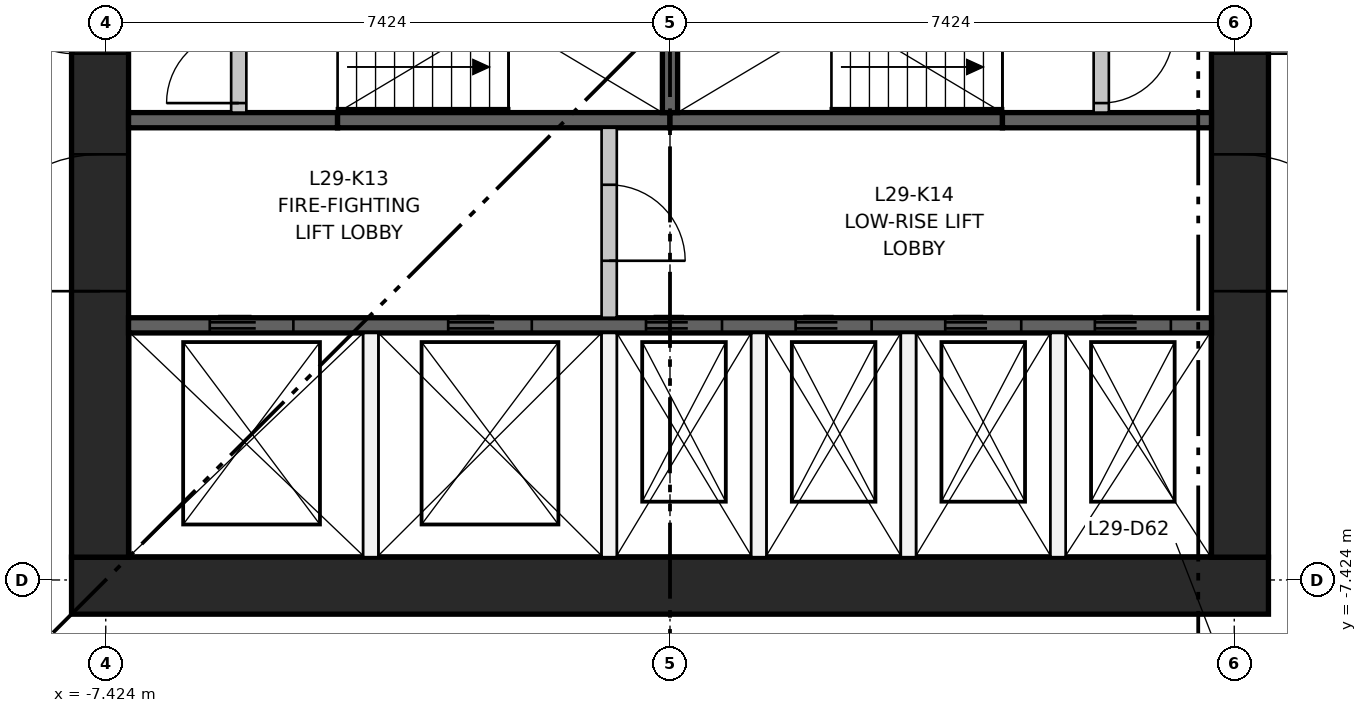
"""IFC4 building model, lengths in metres.
Left out: names, types, materials, properties, quantities, classifications, styles, units other than length and angle.
Written with IfcOpenShell. Run it as: python <this file> out.ifc"""

import sys

from ifc_helpers import new_model, si_unit, direction, frame, frame_2d, origin, place, context, subcontext, project, spatial, rectangle, extrude, element, fill, save


model = new_model("IFC4")
c1 = context("Model", 3, precision=1e-05, world=origin(), true_north=direction((0.0, 1.0)))
c2 = subcontext(c1, "Body", "Model", "MODEL_VIEW")
j1 = project(units=[si_unit("LENGTHUNIT", "METRE"), si_unit("PLANEANGLEUNIT", "RADIAN")], contexts=[c1])
p1 = place(None, origin())
s1 = spatial("IfcSite", under=j1, at=p1, CompositionType="ELEMENT")
p2 = place(p1, origin())
s2 = spatial("IfcBuilding", under=s1, at=p2, CompositionType="ELEMENT")
p3 = place(p2, frame((0.0, 0.0, 112.9)))
s3 = spatial("IfcBuildingStorey", under=s2, at=p3, CompositionType="ELEMENT", Elevation=112.9)
p4 = place(p3, frame((-7.874, -7.499, 0.0), z_axis=(0.0, 0.0, 1.0), x_axis=(1.0, 0.0, 0.0)))
e1 = element("IfcWall", 1, at=p4, inside=s3, PredefinedType="SHEAR", context=c2, shape_type="SweptSolid", body=[
    extrude(rectangle(XDim=15.748, YDim=0.75, at=frame_2d((7.874, 0.0))), origin(), (0.0, 0.0, 1.0), 3.65),
])
p5 = place(p3, frame((-7.499, -7.124, 0.0), z_axis=(0.0, 0.0, 1.0), x_axis=(0.0, 1.0, 0.0)))
e2 = element("IfcWall", 2, at=p5, inside=s3, PredefinedType="SHEAR", context=c2, shape_type="SweptSolid", body=[
    extrude(rectangle(XDim=14.248, YDim=0.75, at=frame_2d((7.124, 0.0))), origin(), (0.0, 0.0, 1.0), 3.65),
])
p6 = place(p5, frame((6.624, 0.0, 0.0)))
e3 = element("IfcOpeningElement", 3, at=p6, cuts=e2, PredefinedType="OPENING", context=c2, shape_type="SweptSolid", body=[
    extrude(rectangle(XDim=1.0, YDim=2.1, at=frame_2d((0.5, 1.05))), frame((0.0, 0.385, 0.0), z_axis=(0.0, -1.0, 0.0), x_axis=(1.0, 0.0, 0.0)), (0.0, 0.0, 1.0), 0.77),
])
p7 = place(p5, frame((3.5, 0.0, 0.0)))
e4 = element("IfcOpeningElement", 4, at=p7, cuts=e2, PredefinedType="OPENING", context=c2, shape_type="SweptSolid", body=[
    extrude(rectangle(XDim=1.8, YDim=2.1, at=frame_2d((0.9, 1.05))), frame((0.0, 0.385, 0.0), z_axis=(0.0, -1.0, 0.0), x_axis=(1.0, 0.0, 0.0)), (0.0, 0.0, 1.0), 0.77),
])
p8 = place(p5, frame((8.948, 0.0, 0.0)))
e5 = element("IfcOpeningElement", 5, at=p8, cuts=e2, PredefinedType="OPENING", context=c2, shape_type="SweptSolid", body=[
    extrude(rectangle(XDim=1.8, YDim=2.1, at=frame_2d((0.9, 1.05))), frame((0.0, 0.385, 0.0), z_axis=(0.0, -1.0, 0.0), x_axis=(1.0, 0.0, 0.0)), (0.0, 0.0, 1.0), 0.77),
])
p9 = place(p5, frame((12.124, 0.0, 0.0)))
e6 = element("IfcOpeningElement", 6, at=p9, cuts=e2, PredefinedType="OPENING", context=c2, shape_type="SweptSolid", body=[
    extrude(rectangle(XDim=1.0, YDim=2.1, at=frame_2d((0.5, 1.05))), frame((0.0, 0.385, 0.0), z_axis=(0.0, -1.0, 0.0), x_axis=(1.0, 0.0, 0.0)), (0.0, 0.0, 1.0), 0.77),
])
p10 = place(p3, frame((7.499, -7.124, 0.0), z_axis=(0.0, 0.0, 1.0), x_axis=(0.0, 1.0, 0.0)))
e7 = element("IfcWall", 7, at=p10, inside=s3, PredefinedType="SHEAR", context=c2, shape_type="SweptSolid", body=[
    extrude(rectangle(XDim=14.248, YDim=0.75, at=frame_2d((7.124, 0.0))), origin(), (0.0, 0.0, 1.0), 3.65),
])
p11 = place(p10, frame((6.624, 0.0, 0.0)))
e8 = element("IfcOpeningElement", 8, at=p11, cuts=e7, PredefinedType="OPENING", context=c2, shape_type="SweptSolid", body=[
    extrude(rectangle(XDim=1.0, YDim=2.1, at=frame_2d((0.5, 1.05))), frame((0.0, 0.385, 0.0), z_axis=(0.0, -1.0, 0.0), x_axis=(1.0, 0.0, 0.0)), (0.0, 0.0, 1.0), 0.77),
])
p12 = place(p10, frame((3.5, 0.0, 0.0)))
e9 = element("IfcOpeningElement", 9, at=p12, cuts=e7, PredefinedType="OPENING", context=c2, shape_type="SweptSolid", body=[
    extrude(rectangle(XDim=1.8, YDim=2.1, at=frame_2d((0.9, 1.05))), frame((0.0, 0.385, 0.0), z_axis=(0.0, -1.0, 0.0), x_axis=(1.0, 0.0, 0.0)), (0.0, 0.0, 1.0), 0.77),
])
p13 = place(p10, frame((8.948, 0.0, 0.0)))
e10 = element("IfcOpeningElement", 10, at=p13, cuts=e7, PredefinedType="OPENING", context=c2, shape_type="SweptSolid", body=[
    extrude(rectangle(XDim=1.8, YDim=2.1, at=frame_2d((0.9, 1.05))), frame((0.0, 0.385, 0.0), z_axis=(0.0, -1.0, 0.0), x_axis=(1.0, 0.0, 0.0)), (0.0, 0.0, 1.0), 0.77),
])
p14 = place(p3, frame((-7.124, -4.074, 0.0), z_axis=(0.0, 0.0, 1.0), x_axis=(1.0, 0.0, 0.0)))
e11 = element("IfcWall", 11, at=p14, inside=s3, PredefinedType="SHEAR", context=c2, shape_type="SweptSolid", body=[
    extrude(rectangle(XDim=14.248, YDim=0.2, at=frame_2d((7.124, 0.0))), origin(), (0.0, 0.0, 1.0), 3.3),
])
p15 = place(p14, frame((1.069, 0.0, 0.0)))
e12 = element("IfcOpeningElement", 12, at=p15, cuts=e11, PredefinedType="OPENING", context=c2, shape_type="SweptSolid", body=[
    extrude(rectangle(XDim=1.1, YDim=2.1, at=frame_2d((0.55, 1.05))), frame((0.0, 0.11, 0.0), z_axis=(0.0, -1.0, 0.0), x_axis=(1.0, 0.0, 0.0)), (0.0, 0.0, 1.0), 0.22),
])
p16 = place(p14, frame((4.206, 0.0, 0.0)))
e13 = element("IfcOpeningElement", 13, at=p16, cuts=e11, PredefinedType="OPENING", context=c2, shape_type="SweptSolid", body=[
    extrude(rectangle(XDim=1.1, YDim=2.1, at=frame_2d((0.55, 1.05))), frame((0.0, 0.11, 0.0), z_axis=(0.0, -1.0, 0.0), x_axis=(1.0, 0.0, 0.0)), (0.0, 0.0, 1.0), 0.22),
])
p17 = place(p14, frame((6.808, 0.0, 0.0)))
e14 = element("IfcOpeningElement", 14, at=p17, cuts=e11, PredefinedType="OPENING", context=c2, shape_type="SweptSolid", body=[
    extrude(rectangle(XDim=1.0, YDim=2.1, at=frame_2d((0.5, 1.05))), frame((0.0, 0.11, 0.0), z_axis=(0.0, -1.0, 0.0), x_axis=(1.0, 0.0, 0.0)), (0.0, 0.0, 1.0), 0.22),
])
p18 = place(p14, frame((8.777, 0.0, 0.0)))
e15 = element("IfcOpeningElement", 15, at=p18, cuts=e11, PredefinedType="OPENING", context=c2, shape_type="SweptSolid", body=[
    extrude(rectangle(XDim=1.0, YDim=2.1, at=frame_2d((0.5, 1.05))), frame((0.0, 0.11, 0.0), z_axis=(0.0, -1.0, 0.0), x_axis=(1.0, 0.0, 0.0)), (0.0, 0.0, 1.0), 0.22),
])
p19 = place(p14, frame((10.745, 0.0, 0.0)))
e16 = element("IfcOpeningElement", 16, at=p19, cuts=e11, PredefinedType="OPENING", context=c2, shape_type="SweptSolid", body=[
    extrude(rectangle(XDim=1.0, YDim=2.1, at=frame_2d((0.5, 1.05))), frame((0.0, 0.11, 0.0), z_axis=(0.0, -1.0, 0.0), x_axis=(1.0, 0.0, 0.0)), (0.0, 0.0, 1.0), 0.22),
])
p20 = place(p14, frame((12.714, 0.0, 0.0)))
e17 = element("IfcOpeningElement", 17, at=p20, cuts=e11, PredefinedType="OPENING", context=c2, shape_type="SweptSolid", body=[
    extrude(rectangle(XDim=1.0, YDim=2.1, at=frame_2d((0.5, 1.05))), frame((0.0, 0.11, 0.0), z_axis=(0.0, -1.0, 0.0), x_axis=(1.0, 0.0, 0.0)), (0.0, 0.0, 1.0), 0.22),
])
p21 = place(p3, frame((-7.124, -1.375, 0.0), z_axis=(0.0, 0.0, 1.0), x_axis=(1.0, 0.0, 0.0)))
e18 = element("IfcWall", 18, at=p21, inside=s3, PredefinedType="SHEAR", context=c2, shape_type="SweptSolid", body=[
    extrude(rectangle(XDim=2.75, YDim=0.2, at=frame_2d((1.375, 0.0))), origin(), (0.0, 0.0, 1.0), 3.3),
])
for number, where, z_axis, x_axis in (
    (19, (-4.374, -1.375, 0.0), (0.0, 0.0, 1.0), (1.0, 0.0, 0.0)),
    (20, (0.0, -1.375, 0.0), (0.0, 0.0, 1.0), (1.0, 0.0, 0.0)),
):
    element("IfcWall", number, at=place(p3, frame(where, z_axis=z_axis, x_axis=x_axis)), inside=s3, PredefinedType="SHEAR", context=c2, shape_type="SweptSolid", body=[
        extrude(rectangle(XDim=4.374, YDim=0.2, at=frame_2d((2.187, 0.0))), origin(), (0.0, 0.0, 1.0), 3.3),
    ])
p22 = place(p3, frame((4.374, -1.375, 0.0), z_axis=(0.0, 0.0, 1.0), x_axis=(1.0, 0.0, 0.0)))
e21 = element("IfcWall", 21, at=p22, inside=s3, PredefinedType="SHEAR", context=c2, shape_type="SweptSolid", body=[
    extrude(rectangle(XDim=2.75, YDim=0.2, at=frame_2d((1.375, 0.0))), origin(), (0.0, 0.0, 1.0), 3.3),
])
p23 = place(p3, frame((0.0, -1.275, 0.0), z_axis=(0.0, 0.0, 1.0), x_axis=(0.0, 1.0, 0.0)))
e22 = element("IfcWall", 22, at=p23, inside=s3, PredefinedType="SHEAR", context=c2, shape_type="SweptSolid", body=[
    extrude(rectangle(XDim=2.55, YDim=0.2, at=frame_2d((1.275, 0.0))), origin(), (0.0, 0.0, 1.0), 3.3),
])
for number, where, z_axis, x_axis in (
    (23, (-3.937, -7.124, 0.0), (0.0, 0.0, 1.0), (0.0, 1.0, 0.0)),
    (24, (-0.8, -7.124, 0.0), (0.0, 0.0, 1.0), (0.0, 1.0, 0.0)),
):
    element("IfcWall", number, at=place(p3, frame(where, z_axis=z_axis, x_axis=x_axis)), inside=s3, PredefinedType="PARTITIONING", context=c2, shape_type="SweptSolid", body=[
        extrude(rectangle(XDim=2.95, YDim=0.2, at=frame_2d((1.475, 0.0))), origin(), (0.0, 0.0, 1.0), 3.3),
    ])
p24 = place(p3, frame((-0.8, -3.974, 0.0), z_axis=(0.0, 0.0, 1.0), x_axis=(0.0, 1.0, 0.0)))
e25 = element("IfcWall", 25, at=p24, inside=s3, PredefinedType="PARTITIONING", context=c2, shape_type="SweptSolid", body=[
    extrude(rectangle(XDim=2.499, YDim=0.2, at=frame_2d((1.25, 0.0))), origin(), (0.0, 0.0, 1.0), 3.3),
])
p25 = place(p24, frame((0.75, 0.0, 0.0)))
e26 = element("IfcOpeningElement", 26, at=p25, cuts=e25, PredefinedType="OPENING", context=c2, shape_type="SweptSolid", body=[
    extrude(rectangle(XDim=1.0, YDim=2.1, at=frame_2d((0.5, 1.05))), frame((0.0, 0.11, 0.0), z_axis=(0.0, -1.0, 0.0), x_axis=(1.0, 0.0, 0.0)), (0.0, 0.0, 1.0), 0.22),
])
for number, where, z_axis, x_axis in (
    (27, (1.168, -7.124, 0.0), (0.0, 0.0, 1.0), (0.0, 1.0, 0.0)),
    (28, (3.137, -7.124, 0.0), (0.0, 0.0, 1.0), (0.0, 1.0, 0.0)),
    (29, (5.105, -7.124, 0.0), (0.0, 0.0, 1.0), (0.0, 1.0, 0.0)),
):
    element("IfcWall", number, at=place(p3, frame(where, z_axis=z_axis, x_axis=x_axis)), inside=s3, PredefinedType="PARTITIONING", context=c2, shape_type="SweptSolid", body=[
        extrude(rectangle(XDim=2.95, YDim=0.2, at=frame_2d((1.475, 0.0))), origin(), (0.0, 0.0, 1.0), 3.3),
    ])
p26 = place(p3, frame((-5.674, -1.275, 0.0), z_axis=(0.0, 0.0, 1.0), x_axis=(0.0, 1.0, 0.0)))
e30 = element("IfcWall", 30, at=p26, inside=s3, PredefinedType="PARTITIONING", context=c2, shape_type="SweptSolid", body=[
    extrude(rectangle(XDim=2.55, YDim=0.2, at=frame_2d((1.275, 0.0))), origin(), (0.0, 0.0, 1.0), 3.3),
])
p27 = place(p26, frame((0.125, 0.0, 0.0)))
e31 = element("IfcOpeningElement", 31, at=p27, cuts=e30, PredefinedType="OPENING", context=c2, shape_type="SweptSolid", body=[
    extrude(rectangle(XDim=0.95, YDim=2.1, at=frame_2d((0.475, 1.05))), frame((0.0, 0.11, 0.0), z_axis=(0.0, -1.0, 0.0), x_axis=(1.0, 0.0, 0.0)), (0.0, 0.0, 1.0), 0.22),
])
p28 = place(p26, frame((1.475, 0.0, 0.0)))
e32 = element("IfcOpeningElement", 32, at=p28, cuts=e30, PredefinedType="OPENING", context=c2, shape_type="SweptSolid", body=[
    extrude(rectangle(XDim=0.95, YDim=2.1, at=frame_2d((0.475, 1.05))), frame((0.0, 0.11, 0.0), z_axis=(0.0, -1.0, 0.0), x_axis=(1.0, 0.0, 0.0)), (0.0, 0.0, 1.0), 0.22),
])
p29 = place(p3, frame((5.674, -1.275, 0.0), z_axis=(0.0, 0.0, 1.0), x_axis=(0.0, 1.0, 0.0)))
e33 = element("IfcWall", 33, at=p29, inside=s3, PredefinedType="PARTITIONING", context=c2, shape_type="SweptSolid", body=[
    extrude(rectangle(XDim=2.55, YDim=0.2, at=frame_2d((1.275, 0.0))), origin(), (0.0, 0.0, 1.0), 3.3),
])
p30 = place(p29, frame((0.125, 0.0, 0.0)))
e34 = element("IfcOpeningElement", 34, at=p30, cuts=e33, PredefinedType="OPENING", context=c2, shape_type="SweptSolid", body=[
    extrude(rectangle(XDim=0.95, YDim=2.1, at=frame_2d((0.475, 1.05))), frame((0.0, 0.11, 0.0), z_axis=(0.0, -1.0, 0.0), x_axis=(1.0, 0.0, 0.0)), (0.0, 0.0, 1.0), 0.22),
])
p31 = place(p29, frame((1.475, 0.0, 0.0)))
e35 = element("IfcOpeningElement", 35, at=p31, cuts=e33, PredefinedType="OPENING", context=c2, shape_type="SweptSolid", body=[
    extrude(rectangle(XDim=0.95, YDim=2.1, at=frame_2d((0.475, 1.05))), frame((0.0, 0.11, 0.0), z_axis=(0.0, -1.0, 0.0), x_axis=(1.0, 0.0, 0.0)), (0.0, 0.0, 1.0), 0.22),
])
p32 = place(p15, origin())
e36 = element("IfcDoor", 36, at=p32, inside=s3, OperationType="DOUBLE_DOOR_SLIDING", PredefinedType="DOOR", context=c2, shape_type="SweptSolid", body=[
    extrude(rectangle(XDim=1.1, YDim=2.1, at=frame_2d((0.55, 1.05))), frame((0.0, 0.025, 0.0), z_axis=(0.0, -1.0, 0.0), x_axis=(1.0, 0.0, 0.0)), (0.0, 0.0, 1.0), 0.05),
])
fill(e12, e36)
p33 = place(p16, origin())
e37 = element("IfcDoor", 37, at=p33, inside=s3, OperationType="DOUBLE_DOOR_SLIDING", PredefinedType="DOOR", context=c2, shape_type="SweptSolid", body=[
    extrude(rectangle(XDim=1.1, YDim=2.1, at=frame_2d((0.55, 1.05))), frame((0.0, 0.025, 0.0), z_axis=(0.0, -1.0, 0.0), x_axis=(1.0, 0.0, 0.0)), (0.0, 0.0, 1.0), 0.05),
])
fill(e13, e37)
p34 = place(p17, origin())
e38 = element("IfcDoor", 38, at=p34, inside=s3, OperationType="DOUBLE_DOOR_SLIDING", PredefinedType="DOOR", context=c2, shape_type="SweptSolid", body=[
    extrude(rectangle(XDim=1.0, YDim=2.1, at=frame_2d((0.5, 1.05))), frame((0.0, 0.025, 0.0), z_axis=(0.0, -1.0, 0.0), x_axis=(1.0, 0.0, 0.0)), (0.0, 0.0, 1.0), 0.05),
])
fill(e14, e38)
p35 = place(p18, origin())
e39 = element("IfcDoor", 39, at=p35, inside=s3, OperationType="DOUBLE_DOOR_SLIDING", PredefinedType="DOOR", context=c2, shape_type="SweptSolid", body=[
    extrude(rectangle(XDim=1.0, YDim=2.1, at=frame_2d((0.5, 1.05))), frame((0.0, 0.025, 0.0), z_axis=(0.0, -1.0, 0.0), x_axis=(1.0, 0.0, 0.0)), (0.0, 0.0, 1.0), 0.05),
])
fill(e15, e39)
p36 = place(p19, origin())
e40 = element("IfcDoor", 40, at=p36, inside=s3, OperationType="DOUBLE_DOOR_SLIDING", PredefinedType="DOOR", context=c2, shape_type="SweptSolid", body=[
    extrude(rectangle(XDim=1.0, YDim=2.1, at=frame_2d((0.5, 1.05))), frame((0.0, 0.025, 0.0), z_axis=(0.0, -1.0, 0.0), x_axis=(1.0, 0.0, 0.0)), (0.0, 0.0, 1.0), 0.05),
])
fill(e16, e40)
p37 = place(p20, origin())
e41 = element("IfcDoor", 41, at=p37, inside=s3, OperationType="DOUBLE_DOOR_SLIDING", PredefinedType="DOOR", context=c2, shape_type="SweptSolid", body=[
    extrude(rectangle(XDim=1.0, YDim=2.1, at=frame_2d((0.5, 1.05))), frame((0.0, 0.025, 0.0), z_axis=(0.0, -1.0, 0.0), x_axis=(1.0, 0.0, 0.0)), (0.0, 0.0, 1.0), 0.05),
])
fill(e17, e41)
p38 = place(p27, origin())
e42 = element("IfcDoor", 42, at=p38, inside=s3, OperationType="SINGLE_SWING_LEFT", PredefinedType="DOOR", context=c2, shape_type="SweptSolid", body=[
    extrude(rectangle(XDim=0.95, YDim=2.1, at=frame_2d((0.475, 1.05))), frame((0.0, 0.025, 0.0), z_axis=(0.0, -1.0, 0.0), x_axis=(1.0, 0.0, 0.0)), (0.0, 0.0, 1.0), 0.05),
])
fill(e31, e42)
p39 = place(p30, frame((0.95, 0.0, 0.0), z_axis=(0.0, 0.0, 1.0), x_axis=(-1.0, 0.0, 0.0)))
e43 = element("IfcDoor", 43, at=p39, inside=s3, OperationType="SINGLE_SWING_RIGHT", PredefinedType="DOOR", context=c2, shape_type="SweptSolid", body=[
    extrude(rectangle(XDim=0.95, YDim=2.1, at=frame_2d((0.475, 1.05))), frame((0.0, 0.025, 0.0), z_axis=(0.0, -1.0, 0.0), x_axis=(1.0, 0.0, 0.0)), (0.0, 0.0, 1.0), 0.05),
])
fill(e34, e43)
p40 = place(p25, frame((1.0, 0.0, 0.0), z_axis=(0.0, 0.0, 1.0), x_axis=(-1.0, 0.0, 0.0)))
e44 = element("IfcDoor", 44, at=p40, inside=s3, OperationType="SINGLE_SWING_LEFT", PredefinedType="DOOR", context=c2, shape_type="SweptSolid", body=[
    extrude(rectangle(XDim=1.0, YDim=2.1, at=frame_2d((0.5, 1.05))), frame((0.0, 0.025, 0.0), z_axis=(0.0, -1.0, 0.0), x_axis=(1.0, 0.0, 0.0)), (0.0, 0.0, 1.0), 0.05),
])
fill(e26, e44)
p41 = place(p6, origin())
e45 = element("IfcDoor", 45, at=p41, inside=s3, OperationType="SINGLE_SWING_RIGHT", PredefinedType="DOOR", context=c2, shape_type="SweptSolid", body=[
    extrude(rectangle(XDim=1.0, YDim=2.1, at=frame_2d((0.5, 1.05))), frame((0.0, 0.375, 0.0), z_axis=(0.0, -1.0, 0.0), x_axis=(1.0, 0.0, 0.0)), (0.0, 0.0, 1.0), 0.05),
])
fill(e3, e45)
p42 = place(p7, origin())
e46 = element("IfcDoor", 46, at=p42, inside=s3, OperationType="DOUBLE_DOOR_SINGLE_SWING", PredefinedType="DOOR", context=c2, shape_type="SweptSolid", body=[
    extrude(rectangle(XDim=1.8, YDim=2.1, at=frame_2d((0.9, 1.05))), frame((0.0, 0.025, 0.0), z_axis=(0.0, -1.0, 0.0), x_axis=(1.0, 0.0, 0.0)), (0.0, 0.0, 1.0), 0.05),
])
fill(e4, e46)
p43 = place(p11, frame((1.0, 0.0, 0.0), z_axis=(0.0, 0.0, 1.0), x_axis=(-1.0, 0.0, 0.0)))
e47 = element("IfcDoor", 47, at=p43, inside=s3, OperationType="SINGLE_SWING_LEFT", PredefinedType="DOOR", context=c2, shape_type="SweptSolid", body=[
    extrude(rectangle(XDim=1.0, YDim=2.1, at=frame_2d((0.5, 1.05))), frame((0.0, 0.375, 0.0), z_axis=(0.0, -1.0, 0.0), x_axis=(1.0, 0.0, 0.0)), (0.0, 0.0, 1.0), 0.05),
])
fill(e8, e47)
p44 = place(p12, frame((1.8, 0.0, 0.0), z_axis=(0.0, 0.0, 1.0), x_axis=(-1.0, 0.0, 0.0)))
e48 = element("IfcDoor", 48, at=p44, inside=s3, OperationType="DOUBLE_DOOR_SINGLE_SWING", PredefinedType="DOOR", context=c2, shape_type="SweptSolid", body=[
    extrude(rectangle(XDim=1.8, YDim=2.1, at=frame_2d((0.9, 1.05))), frame((0.0, 0.025, 0.0), z_axis=(0.0, -1.0, 0.0), x_axis=(1.0, 0.0, 0.0)), (0.0, 0.0, 1.0), 0.05),
])
fill(e9, e48)
save(model, sys.argv[1])
